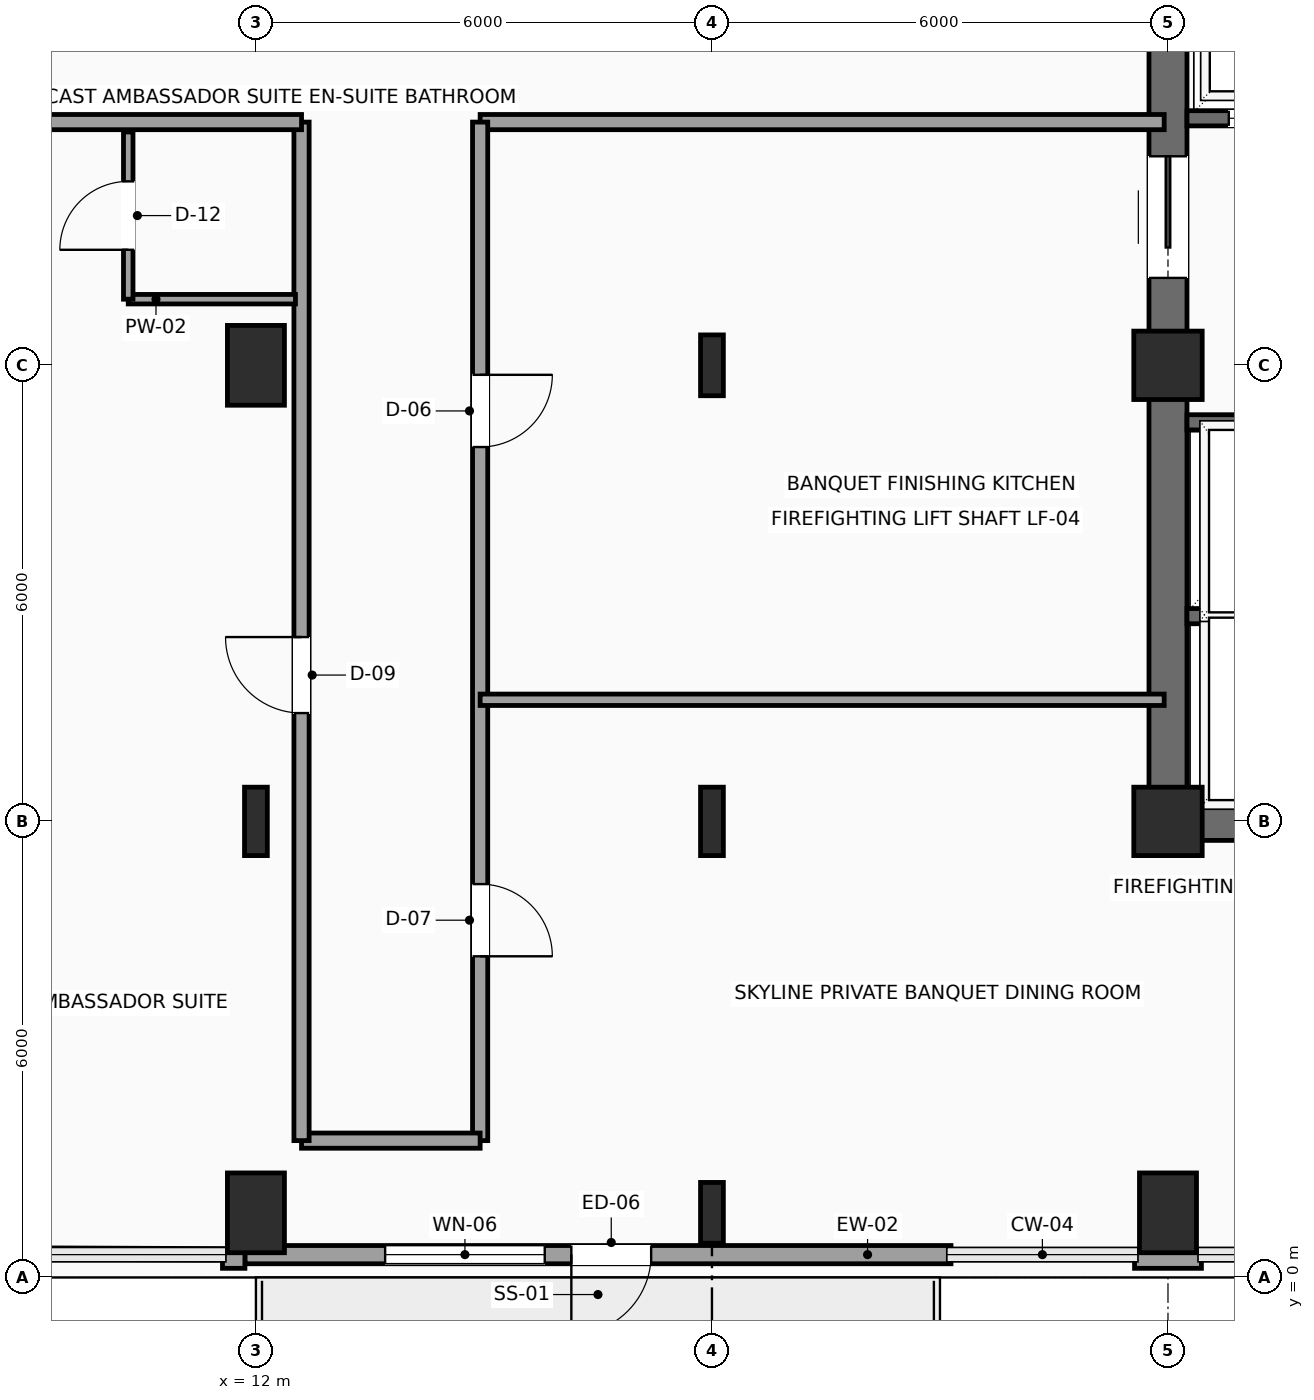
"""IFC4 building model, lengths in metres.
Left out: names, types, materials, properties, quantities, classifications, styles, units other than length and angle.
Written with IfcOpenShell. Run it as: python <this file> out.ifc"""

import sys

from ifc_helpers import new_model, si_unit, direction, frame, frame_2d, origin, origin_2d, place, context, subcontext, project, spatial, rectangle, i_section, extrude, element, fill, save


model = new_model("IFC4")
c1 = context("Model", 3, precision=1e-05, world=origin(), true_north=direction((0.0, 1.0)))
c2 = subcontext(c1, "Body", "Model", "MODEL_VIEW")
j1 = project(units=[si_unit("LENGTHUNIT", "METRE"), si_unit("PLANEANGLEUNIT", "RADIAN")], contexts=[c1])
p1 = place(None, origin())
s1 = spatial("IfcSite", under=j1, at=p1, CompositionType="ELEMENT")
p2 = place(p1, origin())
s2 = spatial("IfcBuilding", under=s1, at=p2, CompositionType="ELEMENT")
p3 = place(p2, frame((0.0, 0.0, 219.9)))
s3 = spatial("IfcBuildingStorey", under=s2, at=p3, CompositionType="ELEMENT", Elevation=219.9)
for number, where, z_axis, x_axis in (
    (1, (24.0, 6.0, 0.0), (0.0, 0.0, 1.0), (1.0, 0.0, 0.0)),
    (2, (24.0, 12.0, 0.0), (0.0, 0.0, 1.0), (1.0, 0.0, 0.0)),
):
    element("IfcColumn", number, at=place(p3, frame(where, z_axis=z_axis, x_axis=x_axis)), inside=s3, PredefinedType="COLUMN", context=c2, shape_type="SweptSolid", body=[
        extrude(rectangle(XDim=0.9, YDim=0.9, at=origin_2d()), origin(), (0.0, 0.0, 1.0), 3.75),
    ])
p4 = place(p3, frame((12.0, 0.85, 0.0), z_axis=(0.0, 0.0, 1.0), x_axis=(1.0, 0.0, 0.0)))
e3 = element("IfcColumn", 3, at=p4, inside=s3, PredefinedType="COLUMN", context=c2, shape_type="SweptSolid", body=[
    extrude(rectangle(XDim=0.75, YDim=1.05, at=origin_2d()), origin(), (0.0, 0.0, 1.0), 3.75),
])
p5 = place(p3, frame((12.0, 6.0, 0.0), z_axis=(0.0, 0.0, 1.0), x_axis=(1.0, 0.0, 0.0)))
e4 = element("IfcColumn", 4, at=p5, inside=s3, PredefinedType="COLUMN", context=c2, shape_type="SweptSolid", body=[
    extrude(i_section(OverallWidth=0.3, OverallDepth=0.9, WebThickness=0.019, FlangeThickness=0.035, FilletRadius=0.03, at=origin_2d()), origin(), (0.0, 0.0, 1.0), 3.75),
])
p6 = place(p3, frame((12.0, 12.0, 0.0), z_axis=(0.0, 0.0, 1.0), x_axis=(1.0, 0.0, 0.0)))
e5 = element("IfcColumn", 5, at=p6, inside=s3, PredefinedType="COLUMN", context=c2, shape_type="SweptSolid", body=[
    extrude(rectangle(XDim=0.75, YDim=1.05, at=origin_2d()), origin(), (0.0, 0.0, 1.0), 3.75),
])
p7 = place(p3, frame((18.0, 0.85, 0.0), z_axis=(0.0, 0.0, 1.0), x_axis=(1.0, 0.0, 0.0)))
e6 = element("IfcColumn", 6, at=p7, inside=s3, PredefinedType="COLUMN", context=c2, shape_type="SweptSolid", body=[
    extrude(i_section(OverallWidth=0.3, OverallDepth=0.8, WebThickness=0.018, FlangeThickness=0.033, FilletRadius=0.03, at=origin_2d()), origin(), (0.0, 0.0, 1.0), 3.75),
])
p8 = place(p3, frame((18.0, 6.0, 0.0), z_axis=(0.0, 0.0, 1.0), x_axis=(1.0, 0.0, 0.0)))
e7 = element("IfcColumn", 7, at=p8, inside=s3, PredefinedType="COLUMN", context=c2, shape_type="SweptSolid", body=[
    extrude(i_section(OverallWidth=0.3, OverallDepth=0.9, WebThickness=0.019, FlangeThickness=0.035, FilletRadius=0.03, at=origin_2d()), origin(), (0.0, 0.0, 1.0), 3.75),
])
p9 = place(p3, frame((18.0, 12.0, 0.0), z_axis=(0.0, 0.0, 1.0), x_axis=(1.0, 0.0, 0.0)))
e8 = element("IfcColumn", 8, at=p9, inside=s3, PredefinedType="COLUMN", context=c2, shape_type="SweptSolid", body=[
    extrude(i_section(OverallWidth=0.3, OverallDepth=0.8, WebThickness=0.018, FlangeThickness=0.033, FilletRadius=0.03, at=origin_2d()), origin(), (0.0, 0.0, 1.0), 3.75),
])
p10 = place(p3, frame((24.0, 0.85, 0.0), z_axis=(0.0, 0.0, 1.0), x_axis=(1.0, 0.0, 0.0)))
e9 = element("IfcColumn", 9, at=p10, inside=s3, PredefinedType="COLUMN", context=c2, shape_type="SweptSolid", body=[
    extrude(rectangle(XDim=0.75, YDim=1.05, at=origin_2d()), origin(), (0.0, 0.0, 1.0), 3.75),
])
p11 = place(p3, frame((21.145, 0.3, 0.0), z_axis=(0.0, 0.0, 1.0), x_axis=(-1.0, 0.0, 0.0)))
e10 = element("IfcWall", 10, at=p11, inside=s3, PredefinedType="SOLIDWALL", context=c2, shape_type="SweptSolid", body=[
    extrude(rectangle(XDim=9.29, YDim=0.24, at=frame_2d((4.645, 0.0))), origin(), (0.0, 0.0, 1.0), 3.54),
])
p12 = place(p11, frame((3.945, 0.0, 0.0)))
e11 = element("IfcOpeningElement", 11, at=p12, cuts=e10, PredefinedType="OPENING", context=c2, shape_type="SweptSolid", body=[
    extrude(rectangle(XDim=1.05, YDim=2.2, at=frame_2d((0.525, 1.1))), frame((0.0, 0.13, 0.0), z_axis=(0.0, -1.0, 0.0), x_axis=(1.0, 0.0, 0.0)), (0.0, 0.0, 1.0), 0.26),
])
p13 = place(p11, frame((5.345, 0.0, 0.85)))
e12 = element("IfcOpeningElement", 12, at=p13, cuts=e10, PredefinedType="OPENING", context=c2, shape_type="SweptSolid", body=[
    extrude(rectangle(XDim=2.1, YDim=2.2, at=frame_2d((1.05, 1.1))), frame((0.0, 0.13, 0.0), z_axis=(0.0, -1.0, 0.0), x_axis=(1.0, 0.0, 0.0)), (0.0, 0.0, 1.0), 0.26),
])
p14 = place(p3, frame((24.44, 0.24, 0.0), z_axis=(0.0, 0.0, 1.0), x_axis=(-1.0, 0.0, 0.0)))
e13 = element("IfcWall", 13, at=p14, inside=s3, PredefinedType="SOLIDWALL", context=c2, shape_type="SweptSolid", body=[
    extrude(rectangle(XDim=0.88, YDim=0.24, at=frame_2d((0.44, 0.0))), origin(), (0.0, 0.0, 1.0), 3.54),
])
p15 = place(p3, frame((11.855, 0.24, 0.0), z_axis=(0.0, 0.0, 1.0), x_axis=(-1.0, 0.0, 0.0)))
e14 = element("IfcWall", 14, at=p15, inside=s3, PredefinedType="SOLIDWALL", context=c2, shape_type="SweptSolid", body=[
    extrude(rectangle(XDim=0.295, YDim=0.24, at=frame_2d((0.147, 0.0))), origin(), (0.0, 0.0, 1.0), 3.54),
])
p16 = place(p3, frame((24.0, 6.0, 0.0), z_axis=(0.0, 0.0, 1.0), x_axis=(1.0, 0.0, 0.0)))
e15 = element("IfcWall", 15, at=p16, inside=s3, PredefinedType="SHEAR", context=c2, shape_type="SweptSolid", body=[
    extrude(rectangle(XDim=9.6, YDim=0.5, at=frame_2d((4.8, 0.0))), origin(), (0.0, 0.0, 1.0), 3.54),
])
p17 = place(p3, frame((24.0, 6.0, 0.0), z_axis=(0.0, 0.0, 1.0), x_axis=(0.0, 1.0, 0.0)))
e16 = element("IfcWall", 16, at=p17, inside=s3, PredefinedType="SHEAR", context=c2, shape_type="SweptSolid", body=[
    extrude(rectangle(XDim=12.0, YDim=0.5, at=frame_2d((6.0, 0.0))), origin(), (0.0, 0.0, 1.0), 3.54),
])
p18 = place(p17, frame((7.15, 0.0, 0.0)))
e17 = element("IfcOpeningElement", 17, at=p18, cuts=e16, PredefinedType="OPENING", context=c2, shape_type="SweptSolid", body=[
    extrude(rectangle(XDim=1.6, YDim=2.3, at=frame_2d((0.8, 1.15))), frame((0.0, 0.26, 0.0), z_axis=(0.0, -1.0, 0.0), x_axis=(1.0, 0.0, 0.0)), (0.0, 0.0, 1.0), 0.52),
])
for number, where, z_axis, x_axis in (
    (18, (24.25, 8.7, 0.0), (0.0, 0.0, 1.0), (1.0, 0.0, 0.0)),
    (19, (24.25, 11.25, 0.0), (0.0, 0.0, 1.0), (1.0, 0.0, 0.0)),
):
    element("IfcWall", number, at=place(p3, frame(where, z_axis=z_axis, x_axis=x_axis)), inside=s3, PredefinedType="SHEAR", context=c2, shape_type="SweptSolid", body=[
        extrude(rectangle(XDim=2.17, YDim=0.2, at=frame_2d((1.085, 0.0))), origin(), (0.0, 0.0, 1.0), 3.54),
    ])
p19 = place(p3, frame((24.25, 15.25, 0.0), z_axis=(0.0, 0.0, 1.0), x_axis=(1.0, 0.0, 0.0)))
e20 = element("IfcWall", 20, at=p19, inside=s3, PredefinedType="SHEAR", context=c2, shape_type="SweptSolid", body=[
    extrude(rectangle(XDim=5.2, YDim=0.2, at=frame_2d((2.6, 0.0))), origin(), (0.0, 0.0, 1.0), 3.54),
])
p20 = place(p19, frame((0.55, 0.0, 0.0)))
e21 = element("IfcOpeningElement", 21, at=p20, cuts=e20, PredefinedType="OPENING", context=c2, shape_type="SweptSolid", body=[
    extrude(rectangle(XDim=1.2, YDim=2.2, at=frame_2d((0.6, 1.1))), frame((0.0, 0.11, 0.0), z_axis=(0.0, -1.0, 0.0), x_axis=(1.0, 0.0, 0.0)), (0.0, 0.0, 1.0), 0.22),
])
p21 = place(p19, frame((3.15, 0.0, 0.0)))
e22 = element("IfcOpeningElement", 22, at=p21, cuts=e20, PredefinedType="OPENING", context=c2, shape_type="SweptSolid", body=[
    extrude(rectangle(XDim=1.2, YDim=2.2, at=frame_2d((0.6, 1.1))), frame((0.0, 0.11, 0.0), z_axis=(0.0, -1.0, 0.0), x_axis=(1.0, 0.0, 0.0)), (0.0, 0.0, 1.0), 0.22),
])
p22 = place(p3, frame((23.95, 15.2, 0.0), z_axis=(0.0, 0.0, 1.0), x_axis=(-1.0, 0.0, 0.0)))
e23 = element("IfcWall", 23, at=p22, inside=s3, PredefinedType="SOLIDWALL", context=c2, shape_type="SweptSolid", body=[
    extrude(rectangle(XDim=9.0, YDim=0.2, at=frame_2d((4.5, 0.0))), origin(), (0.0, 0.0, 1.0), 3.132),
])
p23 = place(p3, frame((14.95, 15.2, 0.0), z_axis=(0.0, 0.0, 1.0), x_axis=(0.0, -1.0, 0.0)))
e24 = element("IfcWall", 24, at=p23, inside=s3, PredefinedType="SOLIDWALL", context=c2, shape_type="SweptSolid", body=[
    extrude(rectangle(XDim=13.4, YDim=0.2, at=frame_2d((6.7, 0.0))), origin(), (0.0, 0.0, 1.0), 3.54),
])
p24 = place(p23, frame((10.025, 0.0, 0.0)))
e25 = element("IfcOpeningElement", 25, at=p24, cuts=e24, PredefinedType="OPENING", context=c2, shape_type="SweptSolid", body=[
    extrude(rectangle(XDim=0.95, YDim=2.15, at=frame_2d((0.475, 1.075))), frame((0.0, 0.11, 0.0), z_axis=(0.0, -1.0, 0.0), x_axis=(1.0, 0.0, 0.0)), (0.0, 0.0, 1.0), 0.22),
])
p25 = place(p23, frame((3.325, 0.0, 0.0)))
e26 = element("IfcOpeningElement", 26, at=p25, cuts=e24, PredefinedType="OPENING", context=c2, shape_type="SweptSolid", body=[
    extrude(rectangle(XDim=0.95, YDim=2.15, at=frame_2d((0.475, 1.075))), frame((0.0, 0.11, 0.0), z_axis=(0.0, -1.0, 0.0), x_axis=(1.0, 0.0, 0.0)), (0.0, 0.0, 1.0), 0.22),
])
p26 = place(p3, frame((14.95, 1.8, 0.0), z_axis=(0.0, 0.0, 1.0), x_axis=(-1.0, 0.0, 0.0)))
e27 = element("IfcWall", 27, at=p26, inside=s3, PredefinedType="SOLIDWALL", context=c2, shape_type="SweptSolid", body=[
    extrude(rectangle(XDim=2.35, YDim=0.2, at=frame_2d((1.175, 0.0))), origin(), (0.0, 0.0, 1.0), 3.54),
])
p27 = place(p3, frame((12.6, 1.8, 0.0), z_axis=(0.0, 0.0, 1.0), x_axis=(0.0, 1.0, 0.0)))
e28 = element("IfcWall", 28, at=p27, inside=s3, PredefinedType="SOLIDWALL", context=c2, shape_type="SweptSolid", body=[
    extrude(rectangle(XDim=13.4, YDim=0.2, at=frame_2d((6.7, 0.0))), origin(), (0.0, 0.0, 1.0), 3.54),
])
p28 = place(p27, frame((5.625, 0.0, 0.0)))
e29 = element("IfcOpeningElement", 29, at=p28, cuts=e28, PredefinedType="OPENING", context=c2, shape_type="SweptSolid", body=[
    extrude(rectangle(XDim=1.0, YDim=2.2, at=frame_2d((0.5, 1.1))), frame((0.0, 0.11, 0.0), z_axis=(0.0, -1.0, 0.0), x_axis=(1.0, 0.0, 0.0)), (0.0, 0.0, 1.0), 0.22),
])
p29 = place(p3, frame((12.6, 15.2, 0.0), z_axis=(0.0, 0.0, 1.0), x_axis=(-1.0, 0.0, 0.0)))
e30 = element("IfcWall", 30, at=p29, inside=s3, PredefinedType="SOLIDWALL", context=c2, shape_type="SweptSolid", body=[
    extrude(rectangle(XDim=12.3, YDim=0.2, at=frame_2d((6.15, 0.0))), origin(), (0.0, 0.0, 1.0), 3.132),
])
p30 = place(p3, frame((0.35, 0.35, 0.0), z_axis=(0.0, 0.0, 1.0), x_axis=(0.999991617913, -0.004094398993, 0.0)))
e31 = element("IfcWall", 31, at=p30, inside=s3, PredefinedType="PARTITIONING", context=c2, shape_type="SweptSolid", body=[
    extrude(rectangle(XDim=11.21, YDim=0.15, at=frame_2d((5.605, 0.0))), origin(), (0.0, 0.0, 1.0), 3.54),
])
p31 = place(p3, frame((10.32, 12.87, 0.0), z_axis=(0.0, 0.0, 1.0), x_axis=(1.0, 0.0, 0.0)))
e32 = element("IfcWall", 32, at=p31, inside=s3, PredefinedType="PARTITIONING", context=c2, shape_type="SweptSolid", body=[
    extrude(rectangle(XDim=2.2, YDim=0.125, at=frame_2d((1.1, 0.0))), origin(), (0.0, 0.0, 1.0), 3.54),
])
p32 = place(p3, frame((10.32, 12.87, 0.0), z_axis=(0.0, 0.0, 1.0), x_axis=(0.0, 1.0, 0.0)))
e33 = element("IfcWall", 33, at=p32, inside=s3, PredefinedType="PARTITIONING", context=c2, shape_type="SweptSolid", body=[
    extrude(rectangle(XDim=2.2, YDim=0.125, at=frame_2d((1.1, 0.0))), origin(), (0.0, 0.0, 1.0), 3.54),
])
p33 = place(p32, frame((0.65, 0.0, 0.0)))
e34 = element("IfcOpeningElement", 34, at=p33, cuts=e33, PredefinedType="OPENING", context=c2, shape_type="SweptSolid", body=[
    extrude(rectangle(XDim=0.9, YDim=2.1, at=frame_2d((0.45, 1.05))), frame((0.0, 0.073, 0.0), z_axis=(0.0, -1.0, 0.0), x_axis=(1.0, 0.0, 0.0)), (0.0, 0.0, 1.0), 0.145),
])
p34 = place(p3, frame((14.95, 7.6, 0.0), z_axis=(0.0, 0.0, 1.0), x_axis=(1.0, 0.0, 0.0)))
e35 = element("IfcWall", 35, at=p34, inside=s3, PredefinedType="PARTITIONING", context=c2, shape_type="SweptSolid", body=[
    extrude(rectangle(XDim=9.0, YDim=0.15, at=frame_2d((4.5, 0.0))), origin(), (0.0, 0.0, 1.0), 3.54),
])
p35 = place(p12, origin())
e36 = element("IfcDoor", 36, at=p35, inside=s3, OperationType="SINGLE_SWING_RIGHT", PredefinedType="DOOR", context=c2, shape_type="SweptSolid", body=[
    extrude(rectangle(XDim=1.05, YDim=2.2, at=frame_2d((0.525, 1.1))), frame((0.0, 0.025, 0.0), z_axis=(0.0, -1.0, 0.0), x_axis=(1.0, 0.0, 0.0)), (0.0, 0.0, 1.0), 0.05),
])
fill(e11, e36)
p36 = place(p13, origin())
e37 = element("IfcWindow", 37, at=p36, inside=s3, PartitioningType="SINGLE_PANEL", PredefinedType="WINDOW", context=c2, shape_type="SweptSolid", body=[
    extrude(rectangle(XDim=2.1, YDim=2.2, at=frame_2d((1.05, 1.1))), frame((0.0, 0.03, 0.0), z_axis=(0.0, -1.0, 0.0), x_axis=(1.0, 0.0, 0.0)), (0.0, 0.0, 1.0), 0.06),
])
fill(e12, e37)
p37 = place(p18, origin())
e38 = element("IfcDoor", 38, at=p37, inside=s3, OperationType="DOUBLE_DOOR_SLIDING", PredefinedType="DOOR", context=c2, shape_type="SweptSolid", body=[
    extrude(rectangle(XDim=1.6, YDim=2.3, at=frame_2d((0.8, 1.15))), frame((0.0, 0.025, 0.0), z_axis=(0.0, -1.0, 0.0), x_axis=(1.0, 0.0, 0.0)), (0.0, 0.0, 1.0), 0.05),
])
fill(e17, e38)
p38 = place(p20, origin())
e39 = element("IfcDoor", 39, at=p38, inside=s3, OperationType="SLIDING_TO_RIGHT", PredefinedType="DOOR", context=c2, shape_type="SweptSolid", body=[
    extrude(rectangle(XDim=1.2, YDim=2.2, at=frame_2d((0.6, 1.1))), frame((0.0, 0.025, 0.0), z_axis=(0.0, -1.0, 0.0), x_axis=(1.0, 0.0, 0.0)), (0.0, 0.0, 1.0), 0.05),
])
fill(e21, e39)
p39 = place(p24, origin())
e40 = element("IfcDoor", 40, at=p39, inside=s3, OperationType="SINGLE_SWING_RIGHT", PredefinedType="DOOR", context=c2, shape_type="SweptSolid", body=[
    extrude(rectangle(XDim=0.95, YDim=2.15, at=frame_2d((0.475, 1.075))), frame((0.0, 0.025, 0.0), z_axis=(0.0, -1.0, 0.0), x_axis=(1.0, 0.0, 0.0)), (0.0, 0.0, 1.0), 0.05),
])
fill(e25, e40)
p40 = place(p25, origin())
e41 = element("IfcDoor", 41, at=p40, inside=s3, OperationType="SINGLE_SWING_LEFT", PredefinedType="DOOR", context=c2, shape_type="SweptSolid", body=[
    extrude(rectangle(XDim=0.95, YDim=2.15, at=frame_2d((0.475, 1.075))), frame((0.0, 0.025, 0.0), z_axis=(0.0, -1.0, 0.0), x_axis=(1.0, 0.0, 0.0)), (0.0, 0.0, 1.0), 0.05),
])
fill(e26, e41)
p41 = place(p28, origin())
e42 = element("IfcDoor", 42, at=p41, inside=s3, OperationType="SINGLE_SWING_RIGHT", PredefinedType="DOOR", context=c2, shape_type="SweptSolid", body=[
    extrude(rectangle(XDim=1.0, YDim=2.2, at=frame_2d((0.5, 1.1))), frame((0.0, 0.025, 0.0), z_axis=(0.0, -1.0, 0.0), x_axis=(1.0, 0.0, 0.0)), (0.0, 0.0, 1.0), 0.05),
])
fill(e29, e42)
p42 = place(p33, origin())
e43 = element("IfcDoor", 43, at=p42, inside=s3, OperationType="SINGLE_SWING_LEFT", PredefinedType="DOOR", context=c2, shape_type="SweptSolid", body=[
    extrude(rectangle(XDim=0.9, YDim=2.1, at=frame_2d((0.45, 1.05))), frame((0.0, 0.025, 0.0), z_axis=(0.0, -1.0, 0.0), x_axis=(1.0, 0.0, 0.0)), (0.0, 0.0, 1.0), 0.05),
])
fill(e34, e43)
save(model, sys.argv[1])
